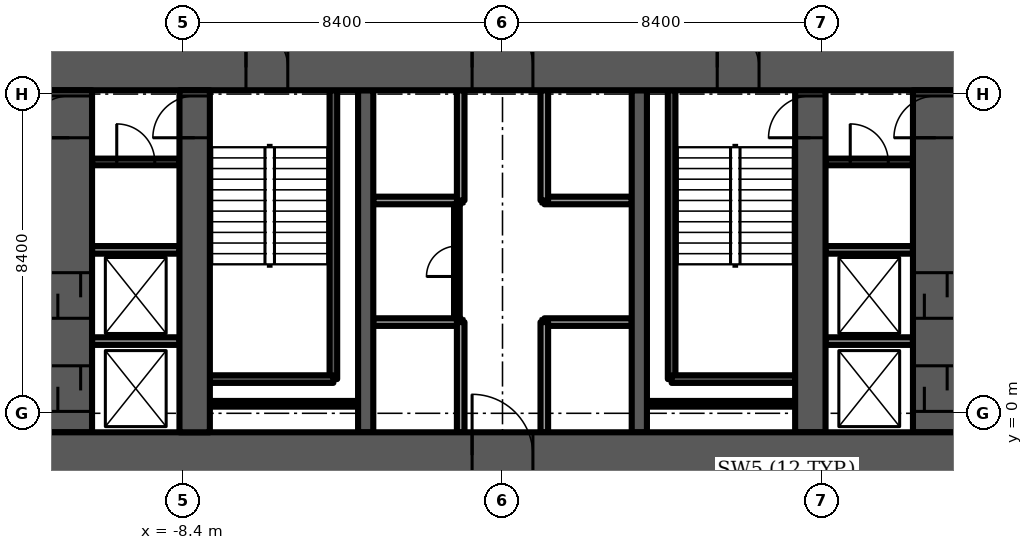
"""IFC4 building model, lengths in metres.
Left out: names, types, materials, properties, quantities, classifications, styles, units other than length and angle.
Written with IfcOpenShell. Run it as: python <this file> out.ifc"""

import sys

from ifc_helpers import new_model, si_unit, direction, frame, frame_2d, origin, place, context, subcontext, project, spatial, rectangle, extrude, element, fill, save


model = new_model("IFC4")
c1 = context("Model", 3, precision=1e-05, world=origin(), true_north=direction((0.0, 1.0)))
c2 = subcontext(c1, "Body", "Model", "MODEL_VIEW")
j1 = project(units=[si_unit("LENGTHUNIT", "METRE"), si_unit("PLANEANGLEUNIT", "RADIAN")], contexts=[c1])
p1 = place(None, origin())
s1 = spatial("IfcSite", under=j1, at=p1, CompositionType="ELEMENT")
p2 = place(p1, origin())
s2 = spatial("IfcBuilding", under=s1, at=p2, CompositionType="ELEMENT")
p3 = place(p2, frame((0.0, 0.0, 6.0)))
s3 = spatial("IfcBuildingStorey", under=s2, at=p3, CompositionType="ELEMENT", Elevation=6.0)
p4 = place(p3, frame((-12.0, -1.1, -0.35), z_axis=(0.0, 0.0, 1.0), x_axis=(1.0, 0.0, 0.0)))
e1 = element("IfcWall", 1, at=p4, inside=s3, PredefinedType="SHEAR", context=c2, shape_type="SweptSolid", body=[
    extrude(rectangle(XDim=24.0, YDim=1.2, at=frame_2d((12.0, 0.0))), origin(), (0.0, 0.0, 1.0), 4.05),
])
p5 = place(p4, frame((11.2, 0.0, 0.0)))
e2 = element("IfcOpeningElement", 2, at=p5, cuts=e1, PredefinedType="OPENING", context=c2, shape_type="SweptSolid", body=[
    extrude(rectangle(XDim=1.6, YDim=2.1, at=frame_2d((0.8, 1.05))), frame((0.0, 0.6, 0.0), z_axis=(0.0, -1.0, 0.0), x_axis=(1.0, 0.0, 0.0)), (0.0, 0.0, 1.0), 1.2),
])
p6 = place(p3, frame((-12.0, 9.1, -0.35), z_axis=(0.0, 0.0, 1.0), x_axis=(1.0, 0.0, 0.0)))
e3 = element("IfcWall", 3, at=p6, inside=s3, PredefinedType="SHEAR", context=c2, shape_type="SweptSolid", body=[
    extrude(rectangle(XDim=24.0, YDim=1.2, at=frame_2d((12.0, 0.0))), origin(), (0.0, 0.0, 1.0), 4.05),
])
p7 = place(p6, frame((11.2, 0.0, 0.0)))
e4 = element("IfcOpeningElement", 4, at=p7, cuts=e3, PredefinedType="OPENING", context=c2, shape_type="SweptSolid", body=[
    extrude(rectangle(XDim=1.6, YDim=2.1, at=frame_2d((0.8, 1.05))), frame((0.0, 0.6, 0.0), z_axis=(0.0, -1.0, 0.0), x_axis=(1.0, 0.0, 0.0)), (0.0, 0.0, 1.0), 1.2),
])
p8 = place(p6, frame((5.25, 0.0, 0.0)))
e5 = element("IfcOpeningElement", 5, at=p8, cuts=e3, PredefinedType="OPENING", context=c2, shape_type="SweptSolid", body=[
    extrude(rectangle(XDim=1.1, YDim=2.1, at=frame_2d((0.55, 1.05))), frame((0.0, 0.6, 0.0), z_axis=(0.0, -1.0, 0.0), x_axis=(1.0, 0.0, 0.0)), (0.0, 0.0, 1.0), 1.2),
])
p9 = place(p6, frame((17.65, 0.0, 0.0)))
e6 = element("IfcOpeningElement", 6, at=p9, cuts=e3, PredefinedType="OPENING", context=c2, shape_type="SweptSolid", body=[
    extrude(rectangle(XDim=1.1, YDim=2.1, at=frame_2d((0.55, 1.05))), frame((0.0, 0.6, 0.0), z_axis=(0.0, -1.0, 0.0), x_axis=(1.0, 0.0, 0.0)), (0.0, 0.0, 1.0), 1.2),
])
p10 = place(p3, frame((-8.1, -0.5, -0.35), z_axis=(0.0, 0.0, 1.0), x_axis=(0.0, 1.0, 0.0)))
e7 = element("IfcWall", 7, at=p10, inside=s3, PredefinedType="SHEAR", context=c2, shape_type="SweptSolid", body=[
    extrude(rectangle(XDim=9.0, YDim=0.8, at=frame_2d((4.5, 0.0))), origin(), (0.0, 0.0, 1.0), 4.05),
])
p11 = place(p10, frame((7.75, 0.0, 0.0)))
e8 = element("IfcOpeningElement", 8, at=p11, cuts=e7, PredefinedType="OPENING", context=c2, shape_type="SweptSolid", body=[
    extrude(rectangle(XDim=1.1, YDim=2.1, at=frame_2d((0.55, 1.05))), frame((0.0, 0.4, 0.0), z_axis=(0.0, -1.0, 0.0), x_axis=(1.0, 0.0, 0.0)), (0.0, 0.0, 1.0), 0.8),
])
p12 = place(p3, frame((8.1, -0.5, -0.35), z_axis=(0.0, 0.0, 1.0), x_axis=(0.0, 1.0, 0.0)))
e9 = element("IfcWall", 9, at=p12, inside=s3, PredefinedType="SHEAR", context=c2, shape_type="SweptSolid", body=[
    extrude(rectangle(XDim=9.0, YDim=0.8, at=frame_2d((4.5, 0.0))), origin(), (0.0, 0.0, 1.0), 4.05),
])
p13 = place(p12, frame((7.75, 0.0, 0.0)))
e10 = element("IfcOpeningElement", 10, at=p13, cuts=e9, PredefinedType="OPENING", context=c2, shape_type="SweptSolid", body=[
    extrude(rectangle(XDim=1.1, YDim=2.1, at=frame_2d((0.55, 1.05))), frame((0.0, 0.4, 0.0), z_axis=(0.0, -1.0, 0.0), x_axis=(1.0, 0.0, 0.0)), (0.0, 0.0, 1.0), 0.8),
])
for number, where, z_axis, x_axis in (
    (11, (-3.6, -0.5, -0.35), (0.0, 0.0, 1.0), (0.0, 1.0, 0.0)),
    (12, (3.6, -0.5, -0.35), (0.0, 0.0, 1.0), (0.0, 1.0, 0.0)),
):
    element("IfcWall", number, at=place(p3, frame(where, z_axis=z_axis, x_axis=x_axis)), inside=s3, PredefinedType="SHEAR", context=c2, shape_type="SweptSolid", body=[
        extrude(rectangle(XDim=9.0, YDim=0.4, at=frame_2d((4.5, 0.0))), origin(), (0.0, 0.0, 1.0), 4.05),
    ])
p14 = place(p3, frame((-11.4, -0.5, -0.35), z_axis=(0.0, 0.0, 1.0), x_axis=(0.0, 1.0, 0.0)))
e13 = element("IfcWall", 13, at=p14, inside=s3, PredefinedType="SHEAR", context=c2, shape_type="SweptSolid", body=[
    extrude(rectangle(XDim=9.0, YDim=1.2, at=frame_2d((4.5, 0.0))), origin(), (0.0, 0.0, 1.0), 4.05),
])
p15 = place(p14, frame((7.75, 0.0, 0.0)))
e14 = element("IfcOpeningElement", 14, at=p15, cuts=e13, PredefinedType="OPENING", context=c2, shape_type="SweptSolid", body=[
    extrude(rectangle(XDim=1.1, YDim=2.1, at=frame_2d((0.55, 1.05))), frame((0.0, 0.6, 0.0), z_axis=(0.0, -1.0, 0.0), x_axis=(1.0, 0.0, 0.0)), (0.0, 0.0, 1.0), 1.2),
])
p16 = place(p14, frame((0.55, 0.0, 0.0)))
e15 = element("IfcOpeningElement", 15, at=p16, cuts=e13, PredefinedType="OPENING", context=c2, shape_type="SweptSolid", body=[
    extrude(rectangle(XDim=1.2, YDim=2.1, at=frame_2d((0.6, 1.05))), frame((0.0, 0.6, 0.0), z_axis=(0.0, -1.0, 0.0), x_axis=(1.0, 0.0, 0.0)), (0.0, 0.0, 1.0), 1.2),
])
p17 = place(p14, frame((3.0, 0.0, 0.0)))
e16 = element("IfcOpeningElement", 16, at=p17, cuts=e13, PredefinedType="OPENING", context=c2, shape_type="SweptSolid", body=[
    extrude(rectangle(XDim=1.2, YDim=2.1, at=frame_2d((0.6, 1.05))), frame((0.0, 0.6, 0.0), z_axis=(0.0, -1.0, 0.0), x_axis=(1.0, 0.0, 0.0)), (0.0, 0.0, 1.0), 1.2),
])
p18 = place(p3, frame((11.4, -0.5, -0.35), z_axis=(0.0, 0.0, 1.0), x_axis=(0.0, 1.0, 0.0)))
e17 = element("IfcWall", 17, at=p18, inside=s3, PredefinedType="SHEAR", context=c2, shape_type="SweptSolid", body=[
    extrude(rectangle(XDim=9.0, YDim=1.2, at=frame_2d((4.5, 0.0))), origin(), (0.0, 0.0, 1.0), 4.05),
])
p19 = place(p18, frame((7.75, 0.0, 0.0)))
e18 = element("IfcOpeningElement", 18, at=p19, cuts=e17, PredefinedType="OPENING", context=c2, shape_type="SweptSolid", body=[
    extrude(rectangle(XDim=1.1, YDim=2.1, at=frame_2d((0.55, 1.05))), frame((0.0, 0.6, 0.0), z_axis=(0.0, -1.0, 0.0), x_axis=(1.0, 0.0, 0.0)), (0.0, 0.0, 1.0), 1.2),
])
p20 = place(p18, frame((0.55, 0.0, 0.0)))
e19 = element("IfcOpeningElement", 19, at=p20, cuts=e17, PredefinedType="OPENING", context=c2, shape_type="SweptSolid", body=[
    extrude(rectangle(XDim=1.2, YDim=2.1, at=frame_2d((0.6, 1.05))), frame((0.0, 0.6, 0.0), z_axis=(0.0, -1.0, 0.0), x_axis=(1.0, 0.0, 0.0)), (0.0, 0.0, 1.0), 1.2),
])
p21 = place(p18, frame((3.0, 0.0, 0.0)))
e20 = element("IfcOpeningElement", 20, at=p21, cuts=e17, PredefinedType="OPENING", context=c2, shape_type="SweptSolid", body=[
    extrude(rectangle(XDim=1.2, YDim=2.1, at=frame_2d((0.6, 1.05))), frame((0.0, 0.6, 0.0), z_axis=(0.0, -1.0, 0.0), x_axis=(1.0, 0.0, 0.0)), (0.0, 0.0, 1.0), 1.2),
])
for number, where, z_axis, x_axis in (
    (21, (-3.4, 2.4, 0.0), (0.0, 0.0, 1.0), (1.0, 0.0, 0.0)),
    (22, (-3.4, 5.6, 0.0), (0.0, 0.0, 1.0), (1.0, 0.0, 0.0)),
    (23, (1.1, 2.4, 0.0), (0.0, 0.0, 1.0), (1.0, 0.0, 0.0)),
    (24, (1.1, 5.6, 0.0), (0.0, 0.0, 1.0), (1.0, 0.0, 0.0)),
):
    element("IfcWall", number, at=place(p3, frame(where, z_axis=z_axis, x_axis=x_axis)), inside=s3, PredefinedType="PARTITIONING", context=c2, shape_type="SweptSolid", body=[
        extrude(rectangle(XDim=2.3, YDim=0.2, at=frame_2d((1.15, 0.0))), origin(), (0.0, 0.0, 1.0), 3.7),
    ])
for number, where, z_axis, x_axis in (
    (25, (-1.1, -0.5, 0.0), (0.0, 0.0, 1.0), (0.0, 1.0, 0.0)),
    (26, (1.1, -0.5, 0.0), (0.0, 0.0, 1.0), (0.0, 1.0, 0.0)),
    (27, (-1.1, 5.6, 0.0), (0.0, 0.0, 1.0), (0.0, 1.0, 0.0)),
    (28, (1.1, 5.6, 0.0), (0.0, 0.0, 1.0), (0.0, 1.0, 0.0)),
):
    element("IfcWall", number, at=place(p3, frame(where, z_axis=z_axis, x_axis=x_axis)), inside=s3, PredefinedType="PARTITIONING", context=c2, shape_type="SweptSolid", body=[
        extrude(rectangle(XDim=2.9, YDim=0.2, at=frame_2d((1.45, 0.0))), origin(), (0.0, 0.0, 1.0), 3.7),
    ])
p22 = place(p3, frame((-4.45, 0.9, -0.35), z_axis=(0.0, 0.0, 1.0), x_axis=(0.0, 1.0, 0.0)))
e29 = element("IfcWall", 29, at=p22, inside=s3, PredefinedType="SOLIDWALL", context=c2, shape_type="SweptSolid", body=[
    extrude(rectangle(XDim=7.6, YDim=0.2, at=frame_2d((3.8, 0.0))), origin(), (0.0, 0.0, 1.0), 4.05),
])
p23 = place(p3, frame((-7.7, 0.9, -0.35), z_axis=(0.0, 0.0, 1.0), x_axis=(1.0, 0.0, 0.0)))
e30 = element("IfcWall", 30, at=p23, inside=s3, PredefinedType="SOLIDWALL", context=c2, shape_type="SweptSolid", body=[
    extrude(rectangle(XDim=3.25, YDim=0.2, at=frame_2d((1.625, 0.0))), origin(), (0.0, 0.0, 1.0), 4.05),
])
p24 = place(p3, frame((-7.7, 0.25, 0.0), z_axis=(0.0, 0.0, 1.0), x_axis=(1.0, 0.0, 0.0)))
e31 = element("IfcWall", 31, at=p24, inside=s3, PredefinedType="PARTITIONING", context=c2, shape_type="SweptSolid", body=[
    extrude(rectangle(XDim=3.9, YDim=0.15, at=frame_2d((1.95, 0.0))), origin(), (0.0, 0.0, 1.0), 3.7),
])
p25 = place(p3, frame((4.45, 0.9, -0.35), z_axis=(0.0, 0.0, 1.0), x_axis=(0.0, 1.0, 0.0)))
e32 = element("IfcWall", 32, at=p25, inside=s3, PredefinedType="SOLIDWALL", context=c2, shape_type="SweptSolid", body=[
    extrude(rectangle(XDim=7.6, YDim=0.2, at=frame_2d((3.8, 0.0))), origin(), (0.0, 0.0, 1.0), 4.05),
])
p26 = place(p3, frame((4.45, 0.9, -0.35), z_axis=(0.0, 0.0, 1.0), x_axis=(1.0, 0.0, 0.0)))
e33 = element("IfcWall", 33, at=p26, inside=s3, PredefinedType="SOLIDWALL", context=c2, shape_type="SweptSolid", body=[
    extrude(rectangle(XDim=3.25, YDim=0.2, at=frame_2d((1.625, 0.0))), origin(), (0.0, 0.0, 1.0), 4.05),
])
p27 = place(p3, frame((3.8, 0.25, 0.0), z_axis=(0.0, 0.0, 1.0), x_axis=(1.0, 0.0, 0.0)))
e34 = element("IfcWall", 34, at=p27, inside=s3, PredefinedType="PARTITIONING", context=c2, shape_type="SweptSolid", body=[
    extrude(rectangle(XDim=3.9, YDim=0.15, at=frame_2d((1.95, 0.0))), origin(), (0.0, 0.0, 1.0), 3.7),
])
p28 = place(p3, frame((-1.2, 2.5, 0.0), z_axis=(0.0, 0.0, 1.0), x_axis=(0.0, 1.0, 0.0)))
e35 = element("IfcWall", 35, at=p28, inside=s3, PredefinedType="PARTITIONING", context=c2, shape_type="SweptSolid", body=[
    extrude(rectangle(XDim=3.0, YDim=0.15, at=frame_2d((1.5, 0.0))), origin(), (0.0, 0.0, 1.0), 3.7),
])
p29 = place(p28, frame((1.1, 0.0, 0.0)))
e36 = element("IfcOpeningElement", 36, at=p29, cuts=e35, PredefinedType="OPENING", context=c2, shape_type="SweptSolid", body=[
    extrude(rectangle(XDim=0.8, YDim=2.1, at=frame_2d((0.4, 1.05))), frame((0.0, 0.075, 0.0), z_axis=(0.0, -1.0, 0.0), x_axis=(1.0, 0.0, 0.0)), (0.0, 0.0, 1.0), 0.15),
])
for number, where, z_axis, x_axis in (
    (37, (-10.8, 1.9, 0.0), (0.0, 0.0, 1.0), (1.0, 0.0, 0.0)),
    (38, (-10.8, 4.3, 0.0), (0.0, 0.0, 1.0), (1.0, 0.0, 0.0)),
):
    element("IfcWall", number, at=place(p3, frame(where, z_axis=z_axis, x_axis=x_axis)), inside=s3, PredefinedType="PARTITIONING", context=c2, shape_type="SweptSolid", body=[
        extrude(rectangle(XDim=2.3, YDim=0.2, at=frame_2d((1.15, 0.0))), origin(), (0.0, 0.0, 1.0), 3.7),
    ])
p30 = place(p3, frame((-10.8, 6.614, 0.0), z_axis=(0.0, 0.0, 1.0), x_axis=(1.0, 0.0, 0.0)))
e39 = element("IfcWall", 39, at=p30, inside=s3, PredefinedType="PARTITIONING", context=c2, shape_type="SweptSolid", body=[
    extrude(rectangle(XDim=2.3, YDim=0.175, at=frame_2d((1.15, 0.0))), origin(), (0.0, 0.0, 1.0), 3.7),
])
p31 = place(p30, frame((0.65, 0.0, 0.0)))
e40 = element("IfcOpeningElement", 40, at=p31, cuts=e39, PredefinedType="OPENING", context=c2, shape_type="SweptSolid", body=[
    extrude(rectangle(XDim=1.0, YDim=2.1, at=frame_2d((0.5, 1.05))), frame((0.0, 0.087, 0.0), z_axis=(0.0, -1.0, 0.0), x_axis=(1.0, 0.0, 0.0)), (0.0, 0.0, 1.0), 0.175),
])
for number, where, z_axis, x_axis in (
    (41, (8.5, 1.9, 0.0), (0.0, 0.0, 1.0), (1.0, 0.0, 0.0)),
    (42, (8.5, 4.3, 0.0), (0.0, 0.0, 1.0), (1.0, 0.0, 0.0)),
):
    element("IfcWall", number, at=place(p3, frame(where, z_axis=z_axis, x_axis=x_axis)), inside=s3, PredefinedType="PARTITIONING", context=c2, shape_type="SweptSolid", body=[
        extrude(rectangle(XDim=2.3, YDim=0.2, at=frame_2d((1.15, 0.0))), origin(), (0.0, 0.0, 1.0), 3.7),
    ])
p32 = place(p3, frame((8.5, 6.614, 0.0), z_axis=(0.0, 0.0, 1.0), x_axis=(1.0, 0.0, 0.0)))
e43 = element("IfcWall", 43, at=p32, inside=s3, PredefinedType="PARTITIONING", context=c2, shape_type="SweptSolid", body=[
    extrude(rectangle(XDim=2.3, YDim=0.175, at=frame_2d((1.15, 0.0))), origin(), (0.0, 0.0, 1.0), 3.7),
])
p33 = place(p32, frame((0.65, 0.0, 0.0)))
e44 = element("IfcOpeningElement", 44, at=p33, cuts=e43, PredefinedType="OPENING", context=c2, shape_type="SweptSolid", body=[
    extrude(rectangle(XDim=1.0, YDim=2.1, at=frame_2d((0.5, 1.05))), frame((0.0, 0.087, 0.0), z_axis=(0.0, -1.0, 0.0), x_axis=(1.0, 0.0, 0.0)), (0.0, 0.0, 1.0), 0.175),
])
p34 = place(p5, origin())
e45 = element("IfcDoor", 45, at=p34, inside=s3, OperationType="DOUBLE_DOOR_SINGLE_SWING", PredefinedType="DOOR", context=c2, shape_type="SweptSolid", body=[
    extrude(rectangle(XDim=1.6, YDim=2.1, at=frame_2d((0.8, 1.05))), frame((0.0, 0.025, 0.0), z_axis=(0.0, -1.0, 0.0), x_axis=(1.0, 0.0, 0.0)), (0.0, 0.0, 1.0), 0.05),
])
fill(e2, e45)
p35 = place(p7, origin())
e46 = element("IfcDoor", 46, at=p35, inside=s3, OperationType="DOUBLE_DOOR_SINGLE_SWING", PredefinedType="DOOR", context=c2, shape_type="SweptSolid", body=[
    extrude(rectangle(XDim=1.6, YDim=2.1, at=frame_2d((0.8, 1.05))), frame((0.0, 0.025, 0.0), z_axis=(0.0, -1.0, 0.0), x_axis=(1.0, 0.0, 0.0)), (0.0, 0.0, 1.0), 0.05),
])
fill(e4, e46)
p36 = place(p8, origin())
e47 = element("IfcDoor", 47, at=p36, inside=s3, OperationType="SINGLE_SWING_LEFT", PredefinedType="DOOR", context=c2, shape_type="SweptSolid", body=[
    extrude(rectangle(XDim=1.1, YDim=2.1, at=frame_2d((0.55, 1.05))), frame((0.0, 0.025, 0.0), z_axis=(0.0, -1.0, 0.0), x_axis=(1.0, 0.0, 0.0)), (0.0, 0.0, 1.0), 0.05),
])
fill(e5, e47)
p37 = place(p11, origin())
e48 = element("IfcDoor", 48, at=p37, inside=s3, OperationType="SINGLE_SWING_RIGHT", PredefinedType="DOOR", context=c2, shape_type="SweptSolid", body=[
    extrude(rectangle(XDim=1.1, YDim=2.1, at=frame_2d((0.55, 1.05))), frame((0.0, 0.025, 0.0), z_axis=(0.0, -1.0, 0.0), x_axis=(1.0, 0.0, 0.0)), (0.0, 0.0, 1.0), 0.05),
])
fill(e8, e48)
p38 = place(p9, origin())
e49 = element("IfcDoor", 49, at=p38, inside=s3, OperationType="SINGLE_SWING_RIGHT", PredefinedType="DOOR", context=c2, shape_type="SweptSolid", body=[
    extrude(rectangle(XDim=1.1, YDim=2.1, at=frame_2d((0.55, 1.05))), frame((0.0, 0.025, 0.0), z_axis=(0.0, -1.0, 0.0), x_axis=(1.0, 0.0, 0.0)), (0.0, 0.0, 1.0), 0.05),
])
fill(e6, e49)
p39 = place(p13, origin())
e50 = element("IfcDoor", 50, at=p39, inside=s3, OperationType="SINGLE_SWING_LEFT", PredefinedType="DOOR", context=c2, shape_type="SweptSolid", body=[
    extrude(rectangle(XDim=1.1, YDim=2.1, at=frame_2d((0.55, 1.05))), frame((0.0, 0.025, 0.0), z_axis=(0.0, -1.0, 0.0), x_axis=(1.0, 0.0, 0.0)), (0.0, 0.0, 1.0), 0.05),
])
fill(e10, e50)
p40 = place(p29, origin())
e51 = element("IfcDoor", 51, at=p40, inside=s3, OperationType="SINGLE_SWING_LEFT", PredefinedType="DOOR", context=c2, shape_type="SweptSolid", body=[
    extrude(rectangle(XDim=0.8, YDim=2.1, at=frame_2d((0.4, 1.05))), frame((0.0, 0.025, 0.0), z_axis=(0.0, -1.0, 0.0), x_axis=(1.0, 0.0, 0.0)), (0.0, 0.0, 1.0), 0.05),
])
fill(e36, e51)
p41 = place(p31, origin())
e52 = element("IfcDoor", 52, at=p41, inside=s3, OperationType="SINGLE_SWING_LEFT", PredefinedType="DOOR", context=c2, shape_type="SweptSolid", body=[
    extrude(rectangle(XDim=1.0, YDim=2.1, at=frame_2d((0.5, 1.05))), frame((0.0, 0.025, 0.0), z_axis=(0.0, -1.0, 0.0), x_axis=(1.0, 0.0, 0.0)), (0.0, 0.0, 1.0), 0.05),
])
fill(e40, e52)
p42 = place(p15, origin())
e53 = element("IfcDoor", 53, at=p42, inside=s3, OperationType="SINGLE_SWING_LEFT", PredefinedType="DOOR", context=c2, shape_type="SweptSolid", body=[
    extrude(rectangle(XDim=1.1, YDim=2.1, at=frame_2d((0.55, 1.05))), frame((0.0, 0.025, 0.0), z_axis=(0.0, -1.0, 0.0), x_axis=(1.0, 0.0, 0.0)), (0.0, 0.0, 1.0), 0.05),
])
fill(e14, e53)
p43 = place(p16, origin())
e54 = element("IfcDoor", 54, at=p43, inside=s3, OperationType="SLIDING_TO_LEFT", PredefinedType="DOOR", context=c2, shape_type="SweptSolid", body=[
    extrude(rectangle(XDim=1.2, YDim=2.1, at=frame_2d((0.6, 1.05))), frame((0.0, 0.025, 0.0), z_axis=(0.0, -1.0, 0.0), x_axis=(1.0, 0.0, 0.0)), (0.0, 0.0, 1.0), 0.05),
])
fill(e15, e54)
p44 = place(p17, origin())
e55 = element("IfcDoor", 55, at=p44, inside=s3, OperationType="SLIDING_TO_LEFT", PredefinedType="DOOR", context=c2, shape_type="SweptSolid", body=[
    extrude(rectangle(XDim=1.2, YDim=2.1, at=frame_2d((0.6, 1.05))), frame((0.0, 0.025, 0.0), z_axis=(0.0, -1.0, 0.0), x_axis=(1.0, 0.0, 0.0)), (0.0, 0.0, 1.0), 0.05),
])
fill(e16, e55)
p45 = place(p33, origin())
e56 = element("IfcDoor", 56, at=p45, inside=s3, OperationType="SINGLE_SWING_RIGHT", PredefinedType="DOOR", context=c2, shape_type="SweptSolid", body=[
    extrude(rectangle(XDim=1.0, YDim=2.1, at=frame_2d((0.5, 1.05))), frame((0.0, 0.025, 0.0), z_axis=(0.0, -1.0, 0.0), x_axis=(1.0, 0.0, 0.0)), (0.0, 0.0, 1.0), 0.05),
])
fill(e44, e56)
p46 = place(p19, origin())
e57 = element("IfcDoor", 57, at=p46, inside=s3, OperationType="SINGLE_SWING_RIGHT", PredefinedType="DOOR", context=c2, shape_type="SweptSolid", body=[
    extrude(rectangle(XDim=1.1, YDim=2.1, at=frame_2d((0.55, 1.05))), frame((0.0, 0.025, 0.0), z_axis=(0.0, -1.0, 0.0), x_axis=(1.0, 0.0, 0.0)), (0.0, 0.0, 1.0), 0.05),
])
fill(e18, e57)
p47 = place(p20, origin())
e58 = element("IfcDoor", 58, at=p47, inside=s3, OperationType="SLIDING_TO_LEFT", PredefinedType="DOOR", context=c2, shape_type="SweptSolid", body=[
    extrude(rectangle(XDim=1.2, YDim=2.1, at=frame_2d((0.6, 1.05))), frame((0.0, 0.025, 0.0), z_axis=(0.0, -1.0, 0.0), x_axis=(1.0, 0.0, 0.0)), (0.0, 0.0, 1.0), 0.05),
])
fill(e19, e58)
p48 = place(p21, origin())
e59 = element("IfcDoor", 59, at=p48, inside=s3, OperationType="SLIDING_TO_LEFT", PredefinedType="DOOR", context=c2, shape_type="SweptSolid", body=[
    extrude(rectangle(XDim=1.2, YDim=2.1, at=frame_2d((0.6, 1.05))), frame((0.0, 0.025, 0.0), z_axis=(0.0, -1.0, 0.0), x_axis=(1.0, 0.0, 0.0)), (0.0, 0.0, 1.0), 0.05),
])
fill(e20, e59)
save(model, sys.argv[1])
